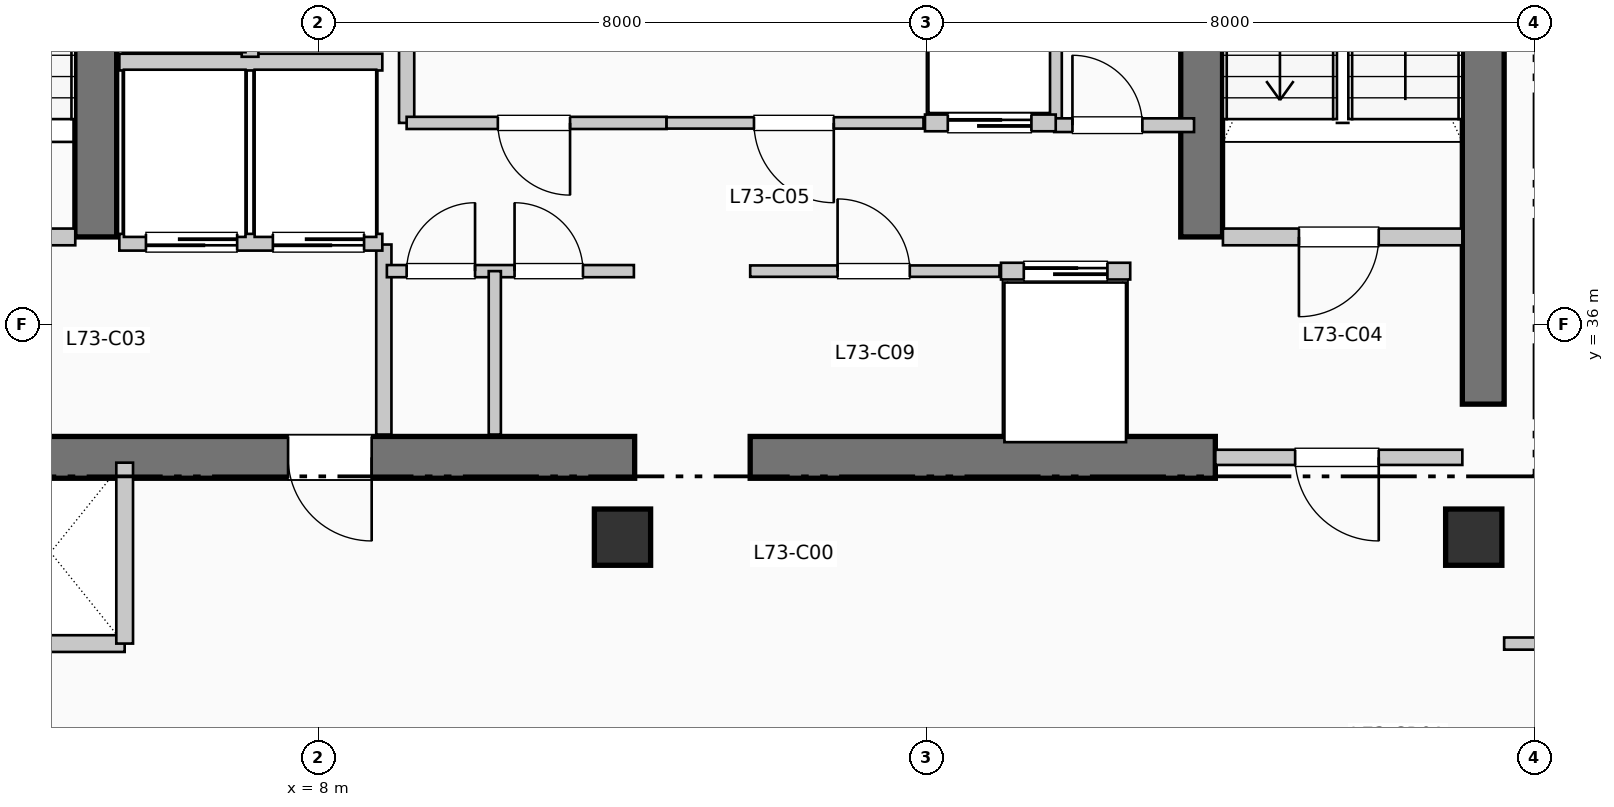
"""IFC4 building model, lengths in metres.
Left out: names, types, materials, properties, quantities, classifications, styles, units other than length and angle.
Written with IfcOpenShell. Run it as: python <this file> out.ifc"""

import sys

from ifc_helpers import new_model, si_unit, direction, frame, frame_2d, origin, origin_2d, place, context, subcontext, project, spatial, rectangle, extrude, element, fill, save


model = new_model("IFC4")
c1 = context("Model", 3, precision=1e-05, world=origin(), true_north=direction((0.0, 1.0)))
c2 = subcontext(c1, "Body", "Model", "MODEL_VIEW")
j1 = project(units=[si_unit("LENGTHUNIT", "METRE"), si_unit("PLANEANGLEUNIT", "RADIAN")], contexts=[c1])
p1 = place(None, origin())
s1 = spatial("IfcSite", under=j1, at=p1, CompositionType="ELEMENT")
p2 = place(p1, origin())
s2 = spatial("IfcBuilding", under=s1, at=p2, CompositionType="ELEMENT")
p3 = place(p2, frame((0.0, 0.0, 299.97)))
s3 = spatial("IfcBuildingStorey", under=s2, at=p3, CompositionType="ELEMENT", Elevation=299.97)
p4 = place(p3, frame((23.325, 34.95, 0.0), z_axis=(0.0, 0.0, 1.0), x_axis=(0.0, 1.0, 0.0)))
e1 = element("IfcWall", 1, at=p4, inside=s3, PredefinedType="SHEAR", context=c2, shape_type="SweptSolid", body=[
    extrude(rectangle(XDim=10.64, YDim=0.55, at=frame_2d((5.32, 0.0))), origin(), (0.0, 0.0, 1.0), 3.96),
])
p5 = place(p3, frame((1.45, 34.25, 0.0), z_axis=(0.0, 0.0, 1.0), x_axis=(1.0, 0.0, 0.0)))
e2 = element("IfcWall", 2, at=p5, inside=s3, PredefinedType="SHEAR", context=c2, shape_type="SweptSolid", body=[
    extrude(rectangle(XDim=10.71, YDim=0.55, at=frame_2d((5.355, 0.0))), origin(), (0.0, 0.0, 1.0), 3.96),
])
p6 = place(p5, frame((7.25, 0.0, 0.0), z_axis=(0.0, 0.0, 1.0), x_axis=(-1.0, 0.0, 0.0)))
e3 = element("IfcOpeningElement", 3, at=p6, cuts=e2, PredefinedType="OPENING", context=c2, shape_type="SweptSolid", body=[
    extrude(rectangle(XDim=1.1, YDim=2.15, at=frame_2d((0.55, 1.075))), frame((0.0, 0.285, 0.0), z_axis=(0.0, -1.0, 0.0), x_axis=(1.0, 0.0, 0.0)), (0.0, 0.0, 1.0), 0.57),
])
p7 = place(p3, frame((13.68, 34.25, 0.0), z_axis=(0.0, 0.0, 1.0), x_axis=(1.0, 0.0, 0.0)))
e4 = element("IfcWall", 4, at=p7, inside=s3, PredefinedType="SHEAR", context=c2, shape_type="SweptSolid", body=[
    extrude(rectangle(XDim=6.12, YDim=0.55, at=frame_2d((3.06, 0.0))), origin(), (0.0, 0.0, 1.0), 3.96),
])
for number, where, z_axis, x_axis in (
    (5, (5.07, 37.15, 0.0), (0.0, 0.0, 1.0), (0.0, 1.0, 0.0)),
    (6, (19.62, 37.15, 0.0), (0.0, 0.0, 1.0), (0.0, 1.0, 0.0)),
):
    element("IfcWall", number, at=place(p3, frame(where, z_axis=z_axis, x_axis=x_axis)), inside=s3, PredefinedType="SHEAR", context=c2, shape_type="SweptSolid", body=[
        extrude(rectangle(XDim=7.89, YDim=0.55, at=frame_2d((3.945, 0.0))), origin(), (0.0, 0.0, 1.0), 3.96),
    ])
for number, where, z_axis, x_axis in (
    (7, (12.0, 33.2, 0.0), (0.0, 0.0, 1.0), (1.0, 0.0, 0.0)),
    (8, (23.2, 33.2, 0.0), (0.0, 0.0, 1.0), (1.0, 0.0, 0.0)),
):
    element("IfcColumn", number, at=place(p3, frame(where, z_axis=z_axis, x_axis=x_axis)), inside=s3, PredefinedType="COLUMN", context=c2, shape_type="SweptSolid", body=[
        extrude(rectangle(XDim=0.74, YDim=0.74, at=origin_2d()), origin(), (0.0, 0.0, 1.0), 3.96),
    ])
p8 = place(p3, frame((1.65, 37.15, 0.0), z_axis=(0.0, 0.0, 1.0), x_axis=(1.0, 0.0, 0.0)))
e9 = element("IfcWall", 9, at=p8, inside=s3, PredefinedType="PARTITIONING", context=c2, shape_type="SweptSolid", body=[
    extrude(rectangle(XDim=3.15, YDim=0.22, at=frame_2d((1.575, 0.0))), origin(), (0.0, 0.0, 1.0), 3.74),
])
p9 = place(p8, frame((2.05, 0.0, 0.0), z_axis=(0.0, 0.0, 1.0), x_axis=(-1.0, 0.0, 0.0)))
e10 = element("IfcOpeningElement", 10, at=p9, cuts=e9, PredefinedType="OPENING", context=c2, shape_type="SweptSolid", body=[
    extrude(rectangle(XDim=1.05, YDim=2.15, at=frame_2d((0.525, 1.075))), frame((0.0, 0.12, 0.0), z_axis=(0.0, -1.0, 0.0), x_axis=(1.0, 0.0, 0.0)), (0.0, 0.0, 1.0), 0.24),
])
p10 = place(p3, frame((8.86, 34.55, 0.0), z_axis=(0.0, 0.0, 1.0), x_axis=(0.0, 1.0, 0.0)))
e11 = element("IfcWall", 11, at=p10, inside=s3, PredefinedType="PARTITIONING", context=c2, shape_type="SweptSolid", body=[
    extrude(rectangle(XDim=2.5, YDim=0.2, at=frame_2d((1.25, 0.0))), origin(), (0.0, 0.0, 1.0), 3.74),
])
p11 = place(p3, frame((19.9, 37.15, 0.0), z_axis=(0.0, 0.0, 1.0), x_axis=(1.0, 0.0, 0.0)))
e12 = element("IfcWall", 12, at=p11, inside=s3, PredefinedType="PARTITIONING", context=c2, shape_type="SweptSolid", body=[
    extrude(rectangle(XDim=3.15, YDim=0.22, at=frame_2d((1.575, 0.0))), origin(), (0.0, 0.0, 1.0), 3.74),
])
p12 = place(p11, frame((2.05, 0.0, 0.0), z_axis=(0.0, 0.0, 1.0), x_axis=(-1.0, 0.0, 0.0)))
e13 = element("IfcOpeningElement", 13, at=p12, cuts=e12, PredefinedType="OPENING", context=c2, shape_type="SweptSolid", body=[
    extrude(rectangle(XDim=1.05, YDim=2.15, at=frame_2d((0.525, 1.075))), frame((0.0, 0.12, 0.0), z_axis=(0.0, -1.0, 0.0), x_axis=(1.0, 0.0, 0.0)), (0.0, 0.0, 1.0), 0.24),
])
p13 = place(p3, frame((19.8, 34.25, 0.0), z_axis=(0.0, 0.0, 1.0), x_axis=(1.0, 0.0, 0.0)))
e14 = element("IfcWall", 14, at=p13, inside=s3, PredefinedType="PARTITIONING", context=c2, shape_type="SweptSolid", body=[
    extrude(rectangle(XDim=3.25, YDim=0.2, at=frame_2d((1.625, 0.0))), origin(), (0.0, 0.0, 1.0), 3.74),
])
p14 = place(p13, frame((2.15, 0.0, 0.0), z_axis=(0.0, 0.0, 1.0), x_axis=(-1.0, 0.0, 0.0)))
e15 = element("IfcOpeningElement", 15, at=p14, cuts=e14, PredefinedType="OPENING", context=c2, shape_type="SweptSolid", body=[
    extrude(rectangle(XDim=1.1, YDim=2.15, at=frame_2d((0.55, 1.075))), frame((0.0, 0.11, 0.0), z_axis=(0.0, -1.0, 0.0), x_axis=(1.0, 0.0, 0.0)), (0.0, 0.0, 1.0), 0.22),
])
p15 = place(p3, frame((5.38, 37.08, 0.0), z_axis=(0.0, 0.0, 1.0), x_axis=(1.0, 0.0, 0.0)))
e16 = element("IfcWall", 16, at=p15, inside=s3, PredefinedType="PARTITIONING", context=c2, shape_type="SweptSolid", body=[
    extrude(rectangle(XDim=3.46, YDim=0.22, at=frame_2d((1.73, 0.0))), origin(), (0.0, 0.0, 1.0), 3.74),
])
p16 = place(p15, frame((1.55, 0.0, 0.0), z_axis=(0.0, 0.0, 1.0), x_axis=(-1.0, 0.0, 0.0)))
e17 = element("IfcOpeningElement", 17, at=p16, cuts=e16, PredefinedType="OPENING", context=c2, shape_type="SweptSolid", body=[
    extrude(rectangle(XDim=1.2, YDim=2.2, at=frame_2d((0.6, 1.1))), frame((0.0, 0.12, 0.0), z_axis=(0.0, -1.0, 0.0), x_axis=(1.0, 0.0, 0.0)), (0.0, 0.0, 1.0), 0.24),
])
p17 = place(p15, frame((3.22, 0.0, 0.0), z_axis=(0.0, 0.0, 1.0), x_axis=(-1.0, 0.0, 0.0)))
e18 = element("IfcOpeningElement", 18, at=p17, cuts=e16, PredefinedType="OPENING", context=c2, shape_type="SweptSolid", body=[
    extrude(rectangle(XDim=1.2, YDim=2.2, at=frame_2d((0.6, 1.1))), frame((0.0, 0.12, 0.0), z_axis=(0.0, -1.0, 0.0), x_axis=(1.0, 0.0, 0.0)), (0.0, 0.0, 1.0), 0.24),
])
p18 = place(p3, frame((5.38, 39.45, 0.0), z_axis=(0.0, 0.0, 1.0), x_axis=(1.0, 0.0, 0.0)))
e19 = element("IfcWall", 19, at=p18, inside=s3, PredefinedType="PARTITIONING", context=c2, shape_type="SweptSolid", body=[
    extrude(rectangle(XDim=3.46, YDim=0.22, at=frame_2d((1.73, 0.0))), origin(), (0.0, 0.0, 1.0), 3.74),
])
p19 = place(p3, frame((7.1, 39.52, 0.0), z_axis=(0.0, 0.0, 1.0), x_axis=(0.0, 1.0, 0.0)))
e20 = element("IfcWall", 20, at=p19, inside=s3, PredefinedType="PARTITIONING", context=c2, shape_type="SweptSolid", body=[
    extrude(rectangle(XDim=2.93, YDim=0.22, at=frame_2d((1.465, 0.0))), origin(), (0.0, 0.0, 1.0), 3.74),
])
p20 = place(p19, frame((0.85, 0.0, 0.0)))
e21 = element("IfcOpeningElement", 21, at=p20, cuts=e20, PredefinedType="OPENING", context=c2, shape_type="SweptSolid", body=[
    extrude(rectangle(XDim=1.1, YDim=2.2, at=frame_2d((0.55, 1.1))), frame((0.0, 0.12, 0.0), z_axis=(0.0, -1.0, 0.0), x_axis=(1.0, 0.0, 0.0)), (0.0, 0.0, 1.0), 0.24),
])
p21 = place(p3, frame((1.55, 31.8, 0.0), z_axis=(0.0, 0.0, 1.0), x_axis=(1.0, 0.0, 0.0)))
e22 = element("IfcWall", 22, at=p21, inside=s3, PredefinedType="PARTITIONING", context=c2, shape_type="SweptSolid", body=[
    extrude(rectangle(XDim=3.9, YDim=0.22, at=frame_2d((1.95, 0.0))), origin(), (0.0, 0.0, 1.0), 3.74),
])
p22 = place(p3, frame((5.45, 31.8, 0.0), z_axis=(0.0, 0.0, 1.0), x_axis=(0.0, 1.0, 0.0)))
e23 = element("IfcWall", 23, at=p22, inside=s3, PredefinedType="PARTITIONING", context=c2, shape_type="SweptSolid", body=[
    extrude(rectangle(XDim=2.38, YDim=0.22, at=frame_2d((1.19, 0.0))), origin(), (0.0, 0.0, 1.0), 3.74),
])
for number, where, z_axis, x_axis in (
    (24, (9.16, 38.65, 0.0), (0.0, 0.0, 1.0), (0.0, 1.0, 0.0)),
    (25, (17.68, 38.65, 0.0), (0.0, 0.0, 1.0), (0.0, 1.0, 0.0)),
):
    element("IfcWall", number, at=place(p3, frame(where, z_axis=z_axis, x_axis=x_axis)), inside=s3, PredefinedType="PARTITIONING", context=c2, shape_type="SweptSolid", body=[
        extrude(rectangle(XDim=2.35, YDim=0.2, at=frame_2d((1.175, 0.0))), origin(), (0.0, 0.0, 1.0), 3.74),
    ])
p23 = place(p3, frame((17.68, 38.62, 0.0), z_axis=(0.0, 0.0, 1.0), x_axis=(1.0, 0.0, 0.0)))
e26 = element("IfcWall", 26, at=p23, inside=s3, PredefinedType="PARTITIONING", context=c2, shape_type="SweptSolid", body=[
    extrude(rectangle(XDim=1.84, YDim=0.18, at=frame_2d((0.92, 0.0))), origin(), (0.0, 0.0, 1.0), 3.74),
])
p24 = place(p23, frame((0.24, 0.0, 0.0)))
e27 = element("IfcOpeningElement", 27, at=p24, cuts=e26, PredefinedType="OPENING", context=c2, shape_type="SweptSolid", body=[
    extrude(rectangle(XDim=0.92, YDim=2.1, at=frame_2d((0.46, 1.05))), frame((0.0, 0.1, 0.0), z_axis=(0.0, -1.0, 0.0), x_axis=(1.0, 0.0, 0.0)), (0.0, 0.0, 1.0), 0.2),
])
p25 = place(p3, frame((8.9, 36.7, 0.0), z_axis=(0.0, 0.0, 1.0), x_axis=(1.0, 0.0, 0.0)))
e28 = element("IfcWall", 28, at=p25, inside=s3, PredefinedType="PARTITIONING", context=c2, shape_type="SweptSolid", body=[
    extrude(rectangle(XDim=3.25, YDim=0.16, at=frame_2d((1.625, 0.0))), origin(), (0.0, 0.0, 1.0), 3.74),
])
p26 = place(p25, frame((0.26, 0.0, 0.0)))
e29 = element("IfcOpeningElement", 29, at=p26, cuts=e28, PredefinedType="OPENING", context=c2, shape_type="SweptSolid", body=[
    extrude(rectangle(XDim=0.9, YDim=2.15, at=frame_2d((0.45, 1.075))), frame((0.0, 0.09, 0.0), z_axis=(0.0, -1.0, 0.0), x_axis=(1.0, 0.0, 0.0)), (0.0, 0.0, 1.0), 0.18),
])
p27 = place(p25, frame((1.68, 0.0, 0.0)))
e30 = element("IfcOpeningElement", 30, at=p27, cuts=e28, PredefinedType="OPENING", context=c2, shape_type="SweptSolid", body=[
    extrude(rectangle(XDim=0.9, YDim=2.15, at=frame_2d((0.45, 1.075))), frame((0.0, 0.09, 0.0), z_axis=(0.0, -1.0, 0.0), x_axis=(1.0, 0.0, 0.0)), (0.0, 0.0, 1.0), 0.18),
])
p28 = place(p3, frame((10.32, 34.55, 0.0), z_axis=(0.0, 0.0, 1.0), x_axis=(0.0, 1.0, 0.0)))
e31 = element("IfcWall", 31, at=p28, inside=s3, PredefinedType="PARTITIONING", context=c2, shape_type="SweptSolid", body=[
    extrude(rectangle(XDim=2.15, YDim=0.16, at=frame_2d((1.075, 0.0))), origin(), (0.0, 0.0, 1.0), 3.74),
])
p29 = place(p3, frame((9.16, 38.65, 0.0), z_axis=(0.0, 0.0, 1.0), x_axis=(1.0, 0.0, 0.0)))
e32 = element("IfcWall", 32, at=p29, inside=s3, PredefinedType="PARTITIONING", context=c2, shape_type="SweptSolid", body=[
    extrude(rectangle(XDim=3.42, YDim=0.16, at=frame_2d((1.71, 0.0))), origin(), (0.0, 0.0, 1.0), 3.74),
])
p30 = place(p29, frame((2.15, 0.0, 0.0), z_axis=(0.0, 0.0, 1.0), x_axis=(-1.0, 0.0, 0.0)))
e33 = element("IfcOpeningElement", 33, at=p30, cuts=e32, PredefinedType="OPENING", context=c2, shape_type="SweptSolid", body=[
    extrude(rectangle(XDim=0.95, YDim=2.15, at=frame_2d((0.475, 1.075))), frame((0.0, 0.09, 0.0), z_axis=(0.0, -1.0, 0.0), x_axis=(1.0, 0.0, 0.0)), (0.0, 0.0, 1.0), 0.18),
])
p31 = place(p3, frame((13.68, 36.7, 0.0), z_axis=(0.0, 0.0, 1.0), x_axis=(1.0, 0.0, 0.0)))
e34 = element("IfcWall", 34, at=p31, inside=s3, PredefinedType="PARTITIONING", context=c2, shape_type="SweptSolid", body=[
    extrude(rectangle(XDim=3.28, YDim=0.15, at=frame_2d((1.64, 0.0))), origin(), (0.0, 0.0, 1.0), 3.74),
])
p32 = place(p31, frame((1.15, 0.0, 0.0)))
e35 = element("IfcOpeningElement", 35, at=p32, cuts=e34, PredefinedType="OPENING", context=c2, shape_type="SweptSolid", body=[
    extrude(rectangle(XDim=0.95, YDim=2.15, at=frame_2d((0.475, 1.075))), frame((0.0, 0.085, 0.0), z_axis=(0.0, -1.0, 0.0), x_axis=(1.0, 0.0, 0.0)), (0.0, 0.0, 1.0), 0.17),
])
p33 = place(p3, frame((12.58, 38.65, 0.0), z_axis=(0.0, 0.0, 1.0), x_axis=(1.0, 0.0, 0.0)))
e36 = element("IfcWall", 36, at=p33, inside=s3, PredefinedType="PARTITIONING", context=c2, shape_type="SweptSolid", body=[
    extrude(rectangle(XDim=3.38, YDim=0.15, at=frame_2d((1.69, 0.0))), origin(), (0.0, 0.0, 1.0), 3.74),
])
p34 = place(p33, frame((2.2, 0.0, 0.0), z_axis=(0.0, 0.0, 1.0), x_axis=(-1.0, 0.0, 0.0)))
e37 = element("IfcOpeningElement", 37, at=p34, cuts=e36, PredefinedType="OPENING", context=c2, shape_type="SweptSolid", body=[
    extrude(rectangle(XDim=1.05, YDim=2.15, at=frame_2d((0.525, 1.075))), frame((0.0, 0.085, 0.0), z_axis=(0.0, -1.0, 0.0), x_axis=(1.0, 0.0, 0.0)), (0.0, 0.0, 1.0), 0.17),
])
p35 = place(p3, frame((16.98, 36.7, 0.0), z_axis=(0.0, 0.0, 1.0), x_axis=(1.0, 0.0, 0.0)))
e38 = element("IfcWall", 38, at=p35, inside=s3, PredefinedType="PARTITIONING", context=c2, shape_type="SweptSolid", body=[
    extrude(rectangle(XDim=1.7, YDim=0.22, at=frame_2d((0.85, 0.0))), origin(), (0.0, 0.0, 1.0), 3.74),
])
p36 = place(p35, frame((0.3, 0.0, 0.0)))
e39 = element("IfcOpeningElement", 39, at=p36, cuts=e38, PredefinedType="OPENING", context=c2, shape_type="SweptSolid", body=[
    extrude(rectangle(XDim=1.1, YDim=2.2, at=frame_2d((0.55, 1.1))), frame((0.0, 0.12, 0.0), z_axis=(0.0, -1.0, 0.0), x_axis=(1.0, 0.0, 0.0)), (0.0, 0.0, 1.0), 0.24),
])
p37 = place(p3, frame((15.98, 38.65, 0.0), z_axis=(0.0, 0.0, 1.0), x_axis=(1.0, 0.0, 0.0)))
e40 = element("IfcWall", 40, at=p37, inside=s3, PredefinedType="PARTITIONING", context=c2, shape_type="SweptSolid", body=[
    extrude(rectangle(XDim=1.72, YDim=0.22, at=frame_2d((0.86, 0.0))), origin(), (0.0, 0.0, 1.0), 3.74),
])
p38 = place(p37, frame((0.3, 0.0, 0.0)))
e41 = element("IfcOpeningElement", 41, at=p38, cuts=e40, PredefinedType="OPENING", context=c2, shape_type="SweptSolid", body=[
    extrude(rectangle(XDim=1.1, YDim=2.2, at=frame_2d((0.55, 1.1))), frame((0.0, 0.12, 0.0), z_axis=(0.0, -1.0, 0.0), x_axis=(1.0, 0.0, 0.0)), (0.0, 0.0, 1.0), 0.24),
])
p39 = place(p3, frame((23.6, 31.8, 0.0), z_axis=(0.0, 0.0, 1.0), x_axis=(1.0, 0.0, 0.0)))
e42 = element("IfcWall", 42, at=p39, inside=s3, PredefinedType="PARTITIONING", context=c2, shape_type="SweptSolid", body=[
    extrude(rectangle(XDim=20.61, YDim=0.16, at=frame_2d((10.305, 0.0))), origin(), (0.0, 0.0, 1.0), 3.74),
])
p40 = place(p39, frame((2.616, 0.0, 0.0)))
e43 = element("IfcOpeningElement", 43, at=p40, cuts=e42, PredefinedType="OPENING", context=c2, shape_type="SweptSolid", body=[
    extrude(rectangle(XDim=0.95, YDim=2.15, at=frame_2d((0.475, 1.075))), frame((0.0, 0.09, 0.0), z_axis=(0.0, -1.0, 0.0), x_axis=(1.0, 0.0, 0.0)), (0.0, 0.0, 1.0), 0.18),
])
p41 = place(p39, frame((9.418, 0.0, 0.0)))
e44 = element("IfcOpeningElement", 44, at=p41, cuts=e42, PredefinedType="OPENING", context=c2, shape_type="SweptSolid", body=[
    extrude(rectangle(XDim=0.95, YDim=2.15, at=frame_2d((0.475, 1.075))), frame((0.0, 0.09, 0.0), z_axis=(0.0, -1.0, 0.0), x_axis=(1.0, 0.0, 0.0)), (0.0, 0.0, 1.0), 0.18),
])
p42 = place(p39, frame((16.631, 0.0, 0.0)))
e45 = element("IfcOpeningElement", 45, at=p42, cuts=e42, PredefinedType="OPENING", context=c2, shape_type="SweptSolid", body=[
    extrude(rectangle(XDim=0.95, YDim=2.15, at=frame_2d((0.475, 1.075))), frame((0.0, 0.09, 0.0), z_axis=(0.0, -1.0, 0.0), x_axis=(1.0, 0.0, 0.0)), (0.0, 0.0, 1.0), 0.18),
])
p43 = place(p6, origin())
e46 = element("IfcDoor", 46, at=p43, inside=s3, OperationType="SINGLE_SWING_RIGHT", PredefinedType="DOOR", context=c2, shape_type="SweptSolid", body=[
    extrude(rectangle(XDim=1.1, YDim=2.15, at=frame_2d((0.55, 1.075))), frame((0.0, 0.025, 0.0), z_axis=(0.0, -1.0, 0.0), x_axis=(1.0, 0.0, 0.0)), (0.0, 0.0, 1.0), 0.05),
])
fill(e3, e46)
p44 = place(p12, origin())
e47 = element("IfcDoor", 47, at=p44, inside=s3, OperationType="SINGLE_SWING_LEFT", PredefinedType="DOOR", context=c2, shape_type="SweptSolid", body=[
    extrude(rectangle(XDim=1.05, YDim=2.15, at=frame_2d((0.525, 1.075))), frame((0.0, 0.025, 0.0), z_axis=(0.0, -1.0, 0.0), x_axis=(1.0, 0.0, 0.0)), (0.0, 0.0, 1.0), 0.05),
])
fill(e13, e47)
p45 = place(p14, origin())
e48 = element("IfcDoor", 48, at=p45, inside=s3, OperationType="SINGLE_SWING_RIGHT", PredefinedType="DOOR", context=c2, shape_type="SweptSolid", body=[
    extrude(rectangle(XDim=1.1, YDim=2.15, at=frame_2d((0.55, 1.075))), frame((0.0, 0.025, 0.0), z_axis=(0.0, -1.0, 0.0), x_axis=(1.0, 0.0, 0.0)), (0.0, 0.0, 1.0), 0.05),
])
fill(e15, e48)
p46 = place(p16, origin())
e49 = element("IfcDoor", 49, at=p46, inside=s3, OperationType="SLIDING_TO_RIGHT", PredefinedType="DOOR", context=c2, shape_type="SweptSolid", body=[
    extrude(rectangle(XDim=1.2, YDim=2.2, at=frame_2d((0.6, 1.1))), frame((0.0, 0.025, 0.0), z_axis=(0.0, -1.0, 0.0), x_axis=(1.0, 0.0, 0.0)), (0.0, 0.0, 1.0), 0.05),
])
fill(e17, e49)
p47 = place(p17, origin())
e50 = element("IfcDoor", 50, at=p47, inside=s3, OperationType="SLIDING_TO_RIGHT", PredefinedType="DOOR", context=c2, shape_type="SweptSolid", body=[
    extrude(rectangle(XDim=1.2, YDim=2.2, at=frame_2d((0.6, 1.1))), frame((0.0, 0.025, 0.0), z_axis=(0.0, -1.0, 0.0), x_axis=(1.0, 0.0, 0.0)), (0.0, 0.0, 1.0), 0.05),
])
fill(e18, e50)
p48 = place(p24, origin())
e51 = element("IfcDoor", 51, at=p48, inside=s3, OperationType="SINGLE_SWING_LEFT", PredefinedType="DOOR", context=c2, shape_type="SweptSolid", body=[
    extrude(rectangle(XDim=0.92, YDim=2.1, at=frame_2d((0.46, 1.05))), frame((0.0, 0.025, 0.0), z_axis=(0.0, -1.0, 0.0), x_axis=(1.0, 0.0, 0.0)), (0.0, 0.0, 1.0), 0.05),
])
fill(e27, e51)
p49 = place(p26, origin())
e52 = element("IfcDoor", 52, at=p49, inside=s3, OperationType="SINGLE_SWING_RIGHT", PredefinedType="DOOR", context=c2, shape_type="SweptSolid", body=[
    extrude(rectangle(XDim=0.9, YDim=2.15, at=frame_2d((0.45, 1.075))), frame((0.0, 0.025, 0.0), z_axis=(0.0, -1.0, 0.0), x_axis=(1.0, 0.0, 0.0)), (0.0, 0.0, 1.0), 0.05),
])
fill(e29, e52)
p50 = place(p27, origin())
e53 = element("IfcDoor", 53, at=p50, inside=s3, OperationType="SINGLE_SWING_LEFT", PredefinedType="DOOR", context=c2, shape_type="SweptSolid", body=[
    extrude(rectangle(XDim=0.9, YDim=2.15, at=frame_2d((0.45, 1.075))), frame((0.0, 0.025, 0.0), z_axis=(0.0, -1.0, 0.0), x_axis=(1.0, 0.0, 0.0)), (0.0, 0.0, 1.0), 0.05),
])
fill(e30, e53)
p51 = place(p30, origin())
e54 = element("IfcDoor", 54, at=p51, inside=s3, OperationType="SINGLE_SWING_RIGHT", PredefinedType="DOOR", context=c2, shape_type="SweptSolid", body=[
    extrude(rectangle(XDim=0.95, YDim=2.15, at=frame_2d((0.475, 1.075))), frame((0.0, 0.025, 0.0), z_axis=(0.0, -1.0, 0.0), x_axis=(1.0, 0.0, 0.0)), (0.0, 0.0, 1.0), 0.05),
])
fill(e33, e54)
p52 = place(p32, origin())
e55 = element("IfcDoor", 55, at=p52, inside=s3, OperationType="SINGLE_SWING_LEFT", PredefinedType="DOOR", context=c2, shape_type="SweptSolid", body=[
    extrude(rectangle(XDim=0.95, YDim=2.15, at=frame_2d((0.475, 1.075))), frame((0.0, 0.025, 0.0), z_axis=(0.0, -1.0, 0.0), x_axis=(1.0, 0.0, 0.0)), (0.0, 0.0, 1.0), 0.05),
])
fill(e35, e55)
p53 = place(p34, origin())
e56 = element("IfcDoor", 56, at=p53, inside=s3, OperationType="SINGLE_SWING_RIGHT", PredefinedType="DOOR", context=c2, shape_type="SweptSolid", body=[
    extrude(rectangle(XDim=1.05, YDim=2.15, at=frame_2d((0.525, 1.075))), frame((0.0, 0.025, 0.0), z_axis=(0.0, -1.0, 0.0), x_axis=(1.0, 0.0, 0.0)), (0.0, 0.0, 1.0), 0.05),
])
fill(e37, e56)
p54 = place(p36, origin())
e57 = element("IfcDoor", 57, at=p54, inside=s3, OperationType="SLIDING_TO_LEFT", PredefinedType="DOOR", context=c2, shape_type="SweptSolid", body=[
    extrude(rectangle(XDim=1.1, YDim=2.2, at=frame_2d((0.55, 1.1))), frame((0.0, 0.025, 0.0), z_axis=(0.0, -1.0, 0.0), x_axis=(1.0, 0.0, 0.0)), (0.0, 0.0, 1.0), 0.05),
])
fill(e39, e57)
p55 = place(p38, origin())
e58 = element("IfcDoor", 58, at=p55, inside=s3, OperationType="SLIDING_TO_LEFT", PredefinedType="DOOR", context=c2, shape_type="SweptSolid", body=[
    extrude(rectangle(XDim=1.1, YDim=2.2, at=frame_2d((0.55, 1.1))), frame((0.0, 0.025, 0.0), z_axis=(0.0, -1.0, 0.0), x_axis=(1.0, 0.0, 0.0)), (0.0, 0.0, 1.0), 0.05),
])
fill(e41, e58)
save(model, sys.argv[1])
